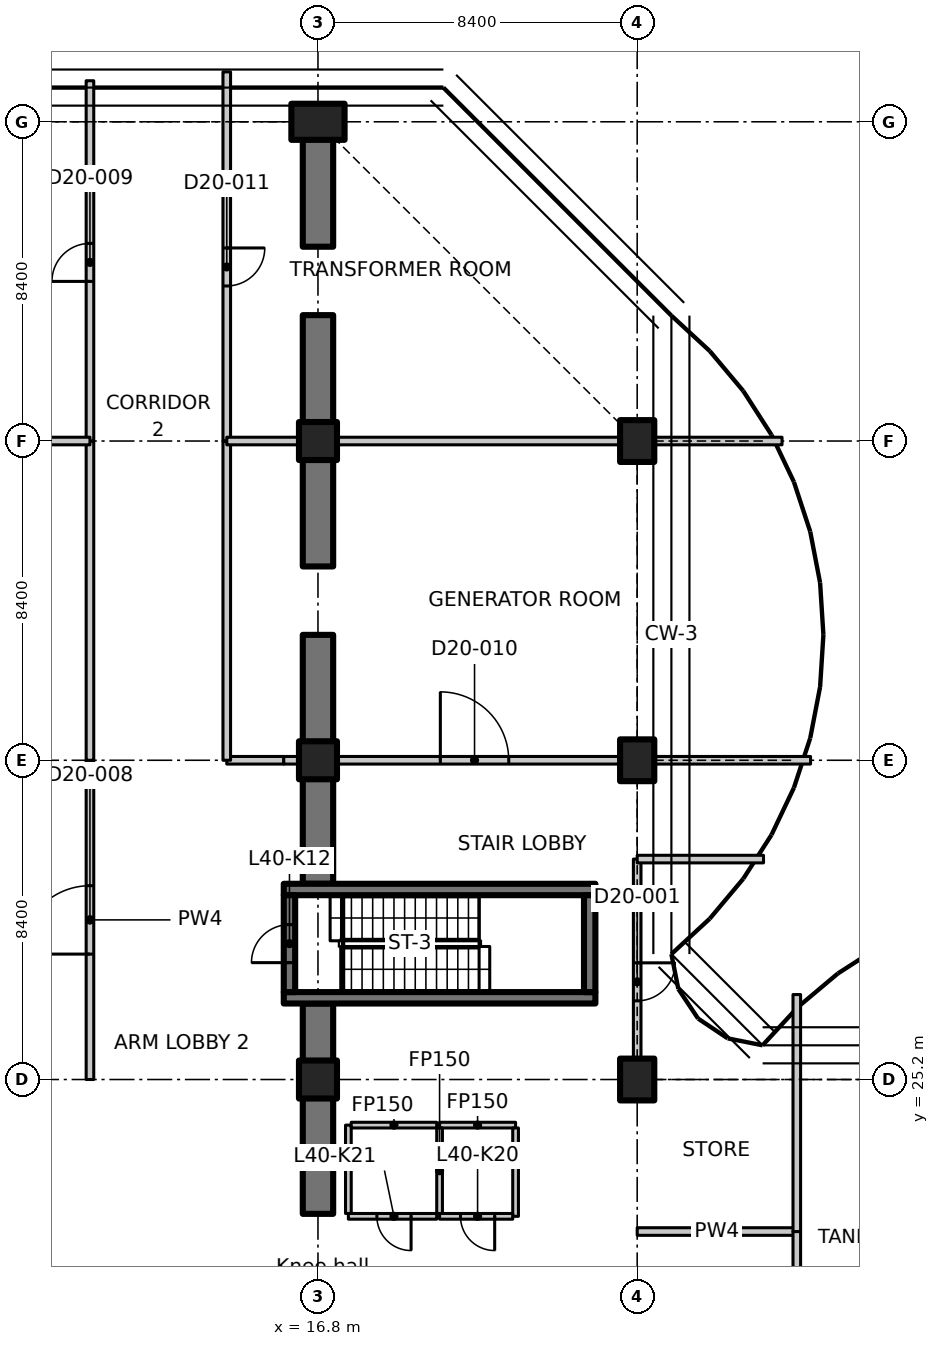
"""IFC4 building model, lengths in metres.
Left out: names, types, materials, properties, quantities, classifications, styles, units other than length and angle.
Written with IfcOpenShell. Run it as: python <this file> out.ifc"""

import sys

from ifc_helpers import new_model, si_unit, direction, frame, frame_2d, origin, origin_2d, place, context, subcontext, project, spatial, polyline, rectangle, outline, extrude, element, fill, save


model = new_model("IFC4")
c1 = context("Model", 3, precision=1e-05, world=origin(), true_north=direction((0.0, 1.0)))
c2 = subcontext(c1, "Body", "Model", "MODEL_VIEW")
j1 = project(units=[si_unit("LENGTHUNIT", "METRE"), si_unit("PLANEANGLEUNIT", "RADIAN")], contexts=[c1])
p1 = place(None, origin())
s1 = spatial("IfcSite", under=j1, at=p1, CompositionType="ELEMENT")
p2 = place(p1, origin())
s2 = spatial("IfcBuilding", under=s1, at=p2, CompositionType="ELEMENT")
p3 = place(p2, frame((0.0, 0.0, 162.0)))
s3 = spatial("IfcBuildingStorey", under=s2, at=p3, CompositionType="ELEMENT", Elevation=162.0)
for number, where, z_axis, x_axis in (
    (1, (16.8, 25.2, 0.0), (0.0, 0.0, 1.0), (1.0, 0.0, 0.0)),
    (2, (16.8, 33.6, 0.0), (0.0, 0.0, 1.0), (1.0, 0.0, 0.0)),
    (3, (16.8, 42.0, 0.0), (0.0, 0.0, 1.0), (1.0, 0.0, 0.0)),
):
    element("IfcColumn", number, at=place(p3, frame(where, z_axis=z_axis, x_axis=x_axis)), inside=s3, PredefinedType="COLUMN", context=c2, shape_type="SweptSolid", body=[
        extrude(rectangle(XDim=1.0, YDim=1.0, at=origin_2d()), origin(), (0.0, 0.0, 1.0), 4.55),
    ])
p4 = place(p3, frame((16.8, 50.4, 0.0), z_axis=(0.0, 0.0, 1.0), x_axis=(0.0, 1.0, 0.0)))
e4 = element("IfcColumn", 4, at=p4, inside=s3, PredefinedType="COLUMN", context=c2, shape_type="SweptSolid", body=[
    extrude(rectangle(XDim=0.95, YDim=1.4, at=origin_2d()), origin(), (0.0, 0.0, 1.0), 4.55),
])
for number, where, z_axis, x_axis in (
    (5, (25.2, 25.2, 0.0), (0.0, 0.0, 1.0), (1.0, 0.0, 0.0)),
    (6, (25.2, 33.6, 0.0), (0.0, 0.0, 1.0), (1.0, 0.0, 0.0)),
    (7, (25.2, 42.0, 0.0), (0.0, 0.0, 1.0), (1.0, 0.0, 0.0)),
):
    element("IfcColumn", number, at=place(p3, frame(where, z_axis=z_axis, x_axis=x_axis)), inside=s3, PredefinedType="COLUMN", context=c2, shape_type="SweptSolid", body=[
        extrude(rectangle(XDim=0.9, YDim=1.1, at=origin_2d()), origin(), (0.0, 0.0, 1.0), 4.55),
    ])
p5 = place(p3, frame((16.8, 21.665, 0.0), z_axis=(0.0, 0.0, 1.0), x_axis=(0.0, 1.0, 0.0)))
e8 = element("IfcWall", 8, at=p5, inside=s3, PredefinedType="SHEAR", context=c2, shape_type="SweptSolid", body=[
    extrude(rectangle(XDim=3.065, YDim=0.8, at=frame_2d((1.532, 0.0))), origin(), (0.0, 0.0, 1.0), 4.55),
])
p6 = place(p3, frame((16.8, 30.35, 0.0), z_axis=(0.0, 0.0, 1.0), x_axis=(0.0, 1.0, 0.0)))
e9 = element("IfcWall", 9, at=p6, inside=s3, PredefinedType="SHEAR", context=c2, shape_type="SweptSolid", body=[
    extrude(rectangle(XDim=2.78, YDim=0.8, at=frame_2d((1.39, 0.0))), origin(), (0.0, 0.0, 1.0), 4.55),
])
p7 = place(p3, frame((16.8, 25.67, 0.0), z_axis=(0.0, 0.0, 1.0), x_axis=(0.0, 1.0, 0.0)))
e10 = element("IfcWall", 10, at=p7, inside=s3, PredefinedType="SHEAR", context=c2, shape_type="SweptSolid", body=[
    extrude(rectangle(XDim=1.53, YDim=0.8, at=frame_2d((0.765, 0.0))), origin(), (0.0, 0.0, 1.0), 4.55),
])
p8 = place(p3, frame((16.8, 34.07, 0.0), z_axis=(0.0, 0.0, 1.0), x_axis=(0.0, 1.0, 0.0)))
e11 = element("IfcWall", 11, at=p8, inside=s3, PredefinedType="SHEAR", context=c2, shape_type="SweptSolid", body=[
    extrude(rectangle(XDim=2.83, YDim=0.8, at=frame_2d((1.415, 0.0))), origin(), (0.0, 0.0, 1.0), 4.55),
])
p9 = place(p3, frame((16.8, 38.7, 0.0), z_axis=(0.0, 0.0, 1.0), x_axis=(0.0, 1.0, 0.0)))
e12 = element("IfcWall", 12, at=p9, inside=s3, PredefinedType="SHEAR", context=c2, shape_type="SweptSolid", body=[
    extrude(rectangle(XDim=2.83, YDim=0.8, at=frame_2d((1.415, 0.0))), origin(), (0.0, 0.0, 1.0), 4.55),
])
for number, where, z_axis, x_axis in (
    (13, (16.8, 42.47, 0.0), (0.0, 0.0, 1.0), (0.0, 1.0, 0.0)),
    (14, (16.8, 47.113, 0.0), (0.0, 0.0, 1.0), (0.0, 1.0, 0.0)),
):
    element("IfcWall", number, at=place(p3, frame(where, z_axis=z_axis, x_axis=x_axis)), inside=s3, PredefinedType="SHEAR", context=c2, shape_type="SweptSolid", body=[
        extrude(rectangle(XDim=2.843, YDim=0.8, at=frame_2d((1.421, 0.0))), origin(), (0.0, 0.0, 1.0), 4.55),
    ])
for number, where, z_axis, x_axis in (
    (15, (15.9, 27.35, 0.0), (0.0, 0.0, 1.0), (1.0, 0.0, 0.0)),
    (16, (15.9, 30.2, 0.0), (0.0, 0.0, 1.0), (1.0, 0.0, 0.0)),
):
    element("IfcWall", number, at=place(p3, frame(where, z_axis=z_axis, x_axis=x_axis)), inside=s3, PredefinedType="SHEAR", context=c2, shape_type="SweptSolid", body=[
        extrude(rectangle(XDim=8.2, YDim=0.3, at=frame_2d((4.1, 0.0))), origin(), (0.0, 0.0, 1.0), 4.55),
    ])
p10 = place(p3, frame((16.05, 27.5, 0.0), z_axis=(0.0, 0.0, 1.0), x_axis=(0.0, 1.0, 0.0)))
e17 = element("IfcWall", 17, at=p10, inside=s3, PredefinedType="SHEAR", context=c2, shape_type="SweptSolid", body=[
    extrude(rectangle(XDim=2.55, YDim=0.3, at=frame_2d((1.275, 0.0))), origin(), (0.0, 0.0, 1.0), 4.55),
])
p11 = place(p10, frame((0.775, 0.0, 0.0)))
e18 = element("IfcOpeningElement", 18, at=p11, cuts=e17, PredefinedType="OPENING", context=c2, shape_type="SweptSolid", body=[
    extrude(rectangle(XDim=1.0, YDim=2.1, at=frame_2d((0.5, 1.05))), frame((0.0, 0.16, 0.0), z_axis=(0.0, -1.0, 0.0), x_axis=(1.0, 0.0, 0.0)), (0.0, 0.0, 1.0), 0.32),
])
p12 = place(p3, frame((23.95, 27.5, 0.0), z_axis=(0.0, 0.0, 1.0), x_axis=(0.0, 1.0, 0.0)))
e19 = element("IfcWall", 19, at=p12, inside=s3, PredefinedType="SHEAR", context=c2, shape_type="SweptSolid", body=[
    extrude(rectangle(XDim=2.55, YDim=0.3, at=frame_2d((1.275, 0.0))), origin(), (0.0, 0.0, 1.0), 4.55),
])
p13 = place(p3, frame((20.0, 24.0, 0.0), z_axis=(0.0, 0.0, 1.0), x_axis=(1.0, 0.0, 0.0)))
e20 = element("IfcWall", 20, at=p13, inside=s3, PredefinedType="PARTITIONING", context=c2, shape_type="SweptSolid", body=[
    extrude(rectangle(XDim=2.0, YDim=0.15, at=frame_2d((1.0, 0.0))), origin(), (0.0, 0.0, 1.0), 4.55),
])
p14 = place(p3, frame((22.0, 23.925, 0.0), z_axis=(0.0, 0.0, 1.0), x_axis=(0.0, -1.0, 0.0)))
e21 = element("IfcWall", 21, at=p14, inside=s3, PredefinedType="PARTITIONING", context=c2, shape_type="SweptSolid", body=[
    extrude(rectangle(XDim=2.325, YDim=0.15, at=frame_2d((1.163, 0.0))), origin(), (0.0, 0.0, 1.0), 4.55),
])
p15 = place(p3, frame((21.925, 21.6, 0.0), z_axis=(0.0, 0.0, 1.0), x_axis=(-1.0, 0.0, 0.0)))
e22 = element("IfcWall", 22, at=p15, inside=s3, PredefinedType="PARTITIONING", context=c2, shape_type="SweptSolid", body=[
    extrude(rectangle(XDim=1.925, YDim=0.15, at=frame_2d((0.962, 0.0))), origin(), (0.0, 0.0, 1.0), 4.55),
])
p16 = place(p15, frame((0.475, 0.0, 0.0)))
e23 = element("IfcOpeningElement", 23, at=p16, cuts=e22, PredefinedType="OPENING", context=c2, shape_type="SweptSolid", body=[
    extrude(rectangle(XDim=0.9, YDim=2.1, at=frame_2d((0.45, 1.05))), frame((0.0, 0.085, 0.0), z_axis=(0.0, -1.0, 0.0), x_axis=(1.0, 0.0, 0.0)), (0.0, 0.0, 1.0), 0.17),
])
p17 = place(p3, frame((20.0, 21.675, 0.0), z_axis=(0.0, 0.0, 1.0), x_axis=(0.0, 1.0, 0.0)))
e24 = element("IfcWall", 24, at=p17, inside=s3, PredefinedType="PARTITIONING", context=c2, shape_type="SweptSolid", body=[
    extrude(rectangle(XDim=2.25, YDim=0.15, at=frame_2d((1.125, 0.0))), origin(), (0.0, 0.0, 1.0), 4.55),
])
p18 = place(p3, frame((19.925, 21.6, 0.0), z_axis=(0.0, 0.0, 1.0), x_axis=(-1.0, 0.0, 0.0)))
e25 = element("IfcWall", 25, at=p18, inside=s3, PredefinedType="PARTITIONING", context=c2, shape_type="SweptSolid", body=[
    extrude(rectangle(XDim=2.325, YDim=0.15, at=frame_2d((1.163, 0.0))), origin(), (0.0, 0.0, 1.0), 4.55),
])
p19 = place(p18, frame((0.675, 0.0, 0.0)))
e26 = element("IfcOpeningElement", 26, at=p19, cuts=e25, PredefinedType="OPENING", context=c2, shape_type="SweptSolid", body=[
    extrude(rectangle(XDim=0.9, YDim=2.1, at=frame_2d((0.45, 1.05))), frame((0.0, 0.085, 0.0), z_axis=(0.0, -1.0, 0.0), x_axis=(1.0, 0.0, 0.0)), (0.0, 0.0, 1.0), 0.17),
])
p20 = place(p3, frame((17.6, 21.675, 0.0), z_axis=(0.0, 0.0, 1.0), x_axis=(0.0, 1.0, 0.0)))
e27 = element("IfcWall", 27, at=p20, inside=s3, PredefinedType="PARTITIONING", context=c2, shape_type="SweptSolid", body=[
    extrude(rectangle(XDim=2.325, YDim=0.15, at=frame_2d((1.163, 0.0))), origin(), (0.0, 0.0, 1.0), 4.55),
])
p21 = place(p3, frame((17.675, 24.0, 0.0), z_axis=(0.0, 0.0, 1.0), x_axis=(1.0, 0.0, 0.0)))
e28 = element("IfcWall", 28, at=p21, inside=s3, PredefinedType="PARTITIONING", context=c2, shape_type="SweptSolid", body=[
    extrude(rectangle(XDim=2.25, YDim=0.15, at=frame_2d((1.125, 0.0))), origin(), (0.0, 0.0, 1.0), 4.55),
])
p22 = place(p3, frame((25.2, 21.2, 0.0), z_axis=(0.0, 0.0, 1.0), x_axis=(1.0, 0.0, 0.0)))
e29 = element("IfcWall", 29, at=p22, inside=s3, PredefinedType="PARTITIONING", context=c2, shape_type="SweptSolid", body=[
    extrude(rectangle(XDim=4.2, YDim=0.2, at=frame_2d((2.1, 0.0))), origin(), (0.0, 0.0, 1.0), 4.53),
])
p23 = place(p3, frame((29.4, 21.2, 0.0), z_axis=(0.0, 0.0, 1.0), x_axis=(0.0, -1.0, 0.0)))
e30 = element("IfcWall", 30, at=p23, inside=s3, PredefinedType="PARTITIONING", context=c2, shape_type="SweptSolid", body=[
    extrude(rectangle(XDim=8.2, YDim=0.2, at=frame_2d((4.1, 0.0))), origin(), (0.0, 0.0, 1.0), 4.53),
])
p24 = place(p3, frame((29.4, 27.436, 0.0), z_axis=(0.0, 0.0, 1.0), x_axis=(0.0, -1.0, 0.0)))
e31 = element("IfcWall", 31, at=p24, inside=s3, PredefinedType="PARTITIONING", context=c2, shape_type="SweptSolid", body=[
    extrude(outline(polyline([(0.0, 0.0), (6.236, 0.0), (6.236, 4.53), (2.686, 4.53), (2.684, 4.18), (1.788, 4.18), (1.786, 4.53), (0.161, 4.53), (0.0, 4.53), (0.0, 0.0)])), frame((0.0, 0.1, 0.0), z_axis=(0.0, -1.0, 0.0), x_axis=(1.0, 0.0, 0.0)), (0.0, 0.0, 1.0), 0.2),
])
p25 = place(p3, frame((25.2, 31.0, 0.0), z_axis=(0.0, 0.0, 1.0), x_axis=(0.0, -1.0, 0.0)))
e32 = element("IfcWall", 32, at=p25, inside=s3, PredefinedType="PARTITIONING", context=c2, shape_type="SweptSolid", body=[
    extrude(outline(polyline([(0.0, 0.0), (5.23, 0.0), (5.23, 4.18), (0.0, 4.18), (0.0, 0.0)])), frame((0.0, 0.1, 0.0), z_axis=(0.0, -1.0, 0.0), x_axis=(1.0, 0.0, 0.0)), (0.0, 0.0, 1.0), 0.2),
])
p26 = place(p25, frame((2.73, 0.0, 0.0)))
e33 = element("IfcOpeningElement", 33, at=p26, cuts=e32, PredefinedType="OPENING", context=c2, shape_type="SweptSolid", body=[
    extrude(rectangle(XDim=1.0, YDim=2.1, at=frame_2d((0.5, 1.05))), frame((0.0, 0.11, 0.0), z_axis=(0.0, -1.0, 0.0), x_axis=(1.0, 0.0, 0.0)), (0.0, 0.0, 1.0), 0.22),
])
p27 = place(p3, frame((25.2, 31.0, 0.0), z_axis=(0.0, 0.0, 1.0), x_axis=(1.0, 0.0, 0.0)))
e34 = element("IfcWall", 34, at=p27, inside=s3, PredefinedType="PARTITIONING", context=c2, shape_type="SweptSolid", body=[
    extrude(rectangle(XDim=3.324, YDim=0.2, at=frame_2d((1.662, 0.0))), origin(), (0.0, 0.0, 1.0), 4.18),
])
p28 = place(p3, frame((10.8, 25.2, 0.0), z_axis=(0.0, 0.0, 1.0), x_axis=(0.0, 1.0, 0.0)))
e35 = element("IfcWall", 35, at=p28, inside=s3, PredefinedType="PARTITIONING", context=c2, shape_type="SweptSolid", body=[
    extrude(rectangle(XDim=8.4, YDim=0.2, at=frame_2d((4.2, 0.0))), origin(), (0.0, 0.0, 1.0), 4.53),
])
p29 = place(p28, frame((3.3, 0.0, 0.0)))
e36 = element("IfcOpeningElement", 36, at=p29, cuts=e35, PredefinedType="OPENING", context=c2, shape_type="SweptSolid", body=[
    extrude(rectangle(XDim=1.8, YDim=2.1, at=frame_2d((0.9, 1.05))), frame((0.0, 0.11, 0.0), z_axis=(0.0, -1.0, 0.0), x_axis=(1.0, 0.0, 0.0)), (0.0, 0.0, 1.0), 0.22),
])
p30 = place(p3, frame((14.4, 33.6, 0.0), z_axis=(0.0, 0.0, 1.0), x_axis=(1.0, 0.0, 0.0)))
e37 = element("IfcWall", 37, at=p30, inside=s3, PredefinedType="PARTITIONING", context=c2, shape_type="SweptSolid", body=[
    extrude(rectangle(XDim=1.5, YDim=0.2, at=frame_2d((0.75, 0.0))), origin(), (0.0, 0.0, 1.0), 4.53),
])
p31 = place(p3, frame((15.9, 33.6, 0.0), z_axis=(0.0, 0.0, 1.0), x_axis=(1.0, 0.0, 0.0)))
e38 = element("IfcWall", 38, at=p31, inside=s3, PredefinedType="PARTITIONING", context=c2, shape_type="SweptSolid", body=[
    extrude(rectangle(XDim=0.38, YDim=0.2, at=frame_2d((0.19, 0.0))), origin(), (0.0, 0.0, 1.0), 4.53),
])
p32 = place(p3, frame((17.32, 33.6, 0.0), z_axis=(0.0, 0.0, 1.0), x_axis=(1.0, 0.0, 0.0)))
e39 = element("IfcWall", 39, at=p32, inside=s3, PredefinedType="PARTITIONING", context=c2, shape_type="SweptSolid", body=[
    extrude(rectangle(XDim=7.41, YDim=0.2, at=frame_2d((3.705, 0.0))), origin(), (0.0, 0.0, 1.0), 4.53),
])
p33 = place(p32, frame((2.7, 0.0, 0.0)))
e40 = element("IfcOpeningElement", 40, at=p33, cuts=e39, PredefinedType="OPENING", context=c2, shape_type="SweptSolid", body=[
    extrude(rectangle(XDim=1.8, YDim=2.1, at=frame_2d((0.9, 1.05))), frame((0.0, 0.11, 0.0), z_axis=(0.0, -1.0, 0.0), x_axis=(1.0, 0.0, 0.0)), (0.0, 0.0, 1.0), 0.22),
])
p34 = place(p3, frame((25.67, 33.6, 0.0), z_axis=(0.0, 0.0, 1.0), x_axis=(1.0, 0.0, 0.0)))
e41 = element("IfcWall", 41, at=p34, inside=s3, PredefinedType="PARTITIONING", context=c2, shape_type="SweptSolid", body=[
    extrude(rectangle(XDim=4.092, YDim=0.2, at=frame_2d((2.046, 0.0))), origin(), (0.0, 0.0, 1.0), 4.18),
])
p35 = place(p3, frame((10.8, 33.6, 0.0), z_axis=(0.0, 0.0, 1.0), x_axis=(0.0, 1.0, 0.0)))
e42 = element("IfcWall", 42, at=p35, inside=s3, PredefinedType="PARTITIONING", context=c2, shape_type="SweptSolid", body=[
    extrude(rectangle(XDim=8.4, YDim=0.2, at=frame_2d((4.2, 0.0))), origin(), (0.0, 0.0, 1.0), 4.53),
])
p36 = place(p3, frame((10.8, 42.0, 0.0), z_axis=(0.0, 0.0, 1.0), x_axis=(0.0, 1.0, 0.0)))
e43 = element("IfcWall", 43, at=p36, inside=s3, PredefinedType="PARTITIONING", context=c2, shape_type="SweptSolid", body=[
    extrude(outline(polyline([(0.0, 0.0), (9.48, 0.0), (9.48, 4.53), (8.85, 4.53), (8.848, 4.18), (7.952, 4.18), (7.95, 4.53), (0.0, 4.53), (0.0, 0.0)])), frame((0.0, 0.1, 0.0), z_axis=(0.0, -1.0, 0.0), x_axis=(1.0, 0.0, 0.0)), (0.0, 0.0, 1.0), 0.2),
])
p37 = place(p36, frame((4.2, 0.0, 0.0)))
e44 = element("IfcOpeningElement", 44, at=p37, cuts=e43, PredefinedType="OPENING", context=c2, shape_type="SweptSolid", body=[
    extrude(rectangle(XDim=1.0, YDim=2.1, at=frame_2d((0.5, 1.05))), frame((0.0, 0.11, 0.0), z_axis=(0.0, -1.0, 0.0), x_axis=(1.0, 0.0, 0.0)), (0.0, 0.0, 1.0), 0.22),
])
p38 = place(p3, frame((14.4, 42.0, 0.0), z_axis=(0.0, 0.0, 1.0), x_axis=(0.0, -1.0, 0.0)))
e45 = element("IfcWall", 45, at=p38, inside=s3, PredefinedType="PARTITIONING", context=c2, shape_type="SweptSolid", body=[
    extrude(rectangle(XDim=8.4, YDim=0.2, at=frame_2d((4.2, 0.0))), origin(), (0.0, 0.0, 1.0), 4.53),
])
p39 = place(p3, frame((14.4, 51.713, 0.0), z_axis=(0.0, 0.0, 1.0), x_axis=(0.0, -1.0, 0.0)))
e46 = element("IfcWall", 46, at=p39, inside=s3, PredefinedType="PARTITIONING", context=c2, shape_type="SweptSolid", body=[
    extrude(outline(polyline([(0.0, 0.0), (9.713, 0.0), (9.713, 4.53), (1.763, 4.53), (1.761, 4.18), (0.865, 4.18), (0.863, 4.53), (0.233, 4.53), (0.0, 4.53), (0.0, 0.0)])), frame((0.0, 0.1, 0.0), z_axis=(0.0, -1.0, 0.0), x_axis=(1.0, 0.0, 0.0)), (0.0, 0.0, 1.0), 0.2),
])
p40 = place(p39, frame((4.633, 0.0, 0.0)))
e47 = element("IfcOpeningElement", 47, at=p40, cuts=e46, PredefinedType="OPENING", context=c2, shape_type="SweptSolid", body=[
    extrude(rectangle(XDim=1.0, YDim=2.1, at=frame_2d((0.5, 1.05))), frame((0.0, 0.11, 0.0), z_axis=(0.0, -1.0, 0.0), x_axis=(1.0, 0.0, 0.0)), (0.0, 0.0, 1.0), 0.22),
])
for number, where, z_axis, x_axis in (
    (48, (8.92, 42.0, 0.0), (0.0, 0.0, 1.0), (1.0, 0.0, 0.0)),
    (49, (14.4, 42.0, 0.0), (0.0, 0.0, 1.0), (1.0, 0.0, 0.0)),
):
    element("IfcWall", number, at=place(p3, frame(where, z_axis=z_axis, x_axis=x_axis)), inside=s3, PredefinedType="PARTITIONING", context=c2, shape_type="SweptSolid", body=[
        extrude(rectangle(XDim=1.88, YDim=0.2, at=frame_2d((0.94, 0.0))), origin(), (0.0, 0.0, 1.0), 4.53),
    ])
p41 = place(p3, frame((17.32, 42.0, 0.0), z_axis=(0.0, 0.0, 1.0), x_axis=(1.0, 0.0, 0.0)))
e50 = element("IfcWall", 50, at=p41, inside=s3, PredefinedType="PARTITIONING", context=c2, shape_type="SweptSolid", body=[
    extrude(outline(polyline([(0.0, 0.0), (7.41, 0.0), (7.41, 4.18), (7.166, 4.18), (7.164, 4.53), (0.0, 4.53), (0.0, 0.0)])), frame((0.0, 0.1, 0.0), z_axis=(0.0, -1.0, 0.0), x_axis=(1.0, 0.0, 0.0)), (0.0, 0.0, 1.0), 0.2),
])
p42 = place(p3, frame((25.67, 42.0, 0.0), z_axis=(0.0, 0.0, 1.0), x_axis=(1.0, 0.0, 0.0)))
e51 = element("IfcWall", 51, at=p42, inside=s3, PredefinedType="PARTITIONING", context=c2, shape_type="SweptSolid", body=[
    extrude(rectangle(XDim=3.342, YDim=0.2, at=frame_2d((1.671, 0.0))), origin(), (0.0, 0.0, 1.0), 4.18),
])
p43 = place(p11, origin())
e52 = element("IfcDoor", 52, at=p43, inside=s3, OperationType="SINGLE_SWING_RIGHT", PredefinedType="DOOR", context=c2, shape_type="SweptSolid", body=[
    extrude(rectangle(XDim=1.0, YDim=2.1, at=frame_2d((0.5, 1.05))), frame((0.0, 0.025, 0.0), z_axis=(0.0, -1.0, 0.0), x_axis=(1.0, 0.0, 0.0)), (0.0, 0.0, 1.0), 0.05),
])
fill(e18, e52)
p44 = place(p16, origin())
e53 = element("IfcDoor", 53, at=p44, inside=s3, OperationType="SINGLE_SWING_RIGHT", PredefinedType="DOOR", context=c2, shape_type="SweptSolid", body=[
    extrude(rectangle(XDim=0.9, YDim=2.1, at=frame_2d((0.45, 1.05))), frame((0.0, 0.025, 0.0), z_axis=(0.0, -1.0, 0.0), x_axis=(1.0, 0.0, 0.0)), (0.0, 0.0, 1.0), 0.05),
])
fill(e23, e53)
p45 = place(p19, origin())
e54 = element("IfcDoor", 54, at=p45, inside=s3, OperationType="SINGLE_SWING_LEFT", PredefinedType="DOOR", context=c2, shape_type="SweptSolid", body=[
    extrude(rectangle(XDim=0.9, YDim=2.1, at=frame_2d((0.45, 1.05))), frame((0.0, 0.025, 0.0), z_axis=(0.0, -1.0, 0.0), x_axis=(1.0, 0.0, 0.0)), (0.0, 0.0, 1.0), 0.05),
])
fill(e26, e54)
p46 = place(p26, origin())
e55 = element("IfcDoor", 55, at=p46, inside=s3, OperationType="SINGLE_SWING_RIGHT", PredefinedType="DOOR", context=c2, shape_type="SweptSolid", body=[
    extrude(rectangle(XDim=1.0, YDim=2.1, at=frame_2d((0.5, 1.05))), frame((0.0, 0.025, 0.0), z_axis=(0.0, -1.0, 0.0), x_axis=(1.0, 0.0, 0.0)), (0.0, 0.0, 1.0), 0.05),
])
fill(e33, e55)
p47 = place(p29, origin())
e56 = element("IfcDoor", 56, at=p47, inside=s3, OperationType="DOUBLE_DOOR_SINGLE_SWING", PredefinedType="DOOR", context=c2, shape_type="SweptSolid", body=[
    extrude(rectangle(XDim=1.8, YDim=2.1, at=frame_2d((0.9, 1.05))), frame((0.0, 0.025, 0.0), z_axis=(0.0, -1.0, 0.0), x_axis=(1.0, 0.0, 0.0)), (0.0, 0.0, 1.0), 0.05),
])
fill(e36, e56)
p48 = place(p37, origin())
e57 = element("IfcDoor", 57, at=p48, inside=s3, OperationType="SINGLE_SWING_LEFT", PredefinedType="DOOR", context=c2, shape_type="SweptSolid", body=[
    extrude(rectangle(XDim=1.0, YDim=2.1, at=frame_2d((0.5, 1.05))), frame((0.0, 0.025, 0.0), z_axis=(0.0, -1.0, 0.0), x_axis=(1.0, 0.0, 0.0)), (0.0, 0.0, 1.0), 0.05),
])
fill(e44, e57)
p49 = place(p33, origin())
e58 = element("IfcDoor", 58, at=p49, inside=s3, OperationType="DOUBLE_DOOR_SINGLE_SWING", PredefinedType="DOOR", context=c2, shape_type="SweptSolid", body=[
    extrude(rectangle(XDim=1.8, YDim=2.1, at=frame_2d((0.9, 1.05))), frame((0.0, 0.025, 0.0), z_axis=(0.0, -1.0, 0.0), x_axis=(1.0, 0.0, 0.0)), (0.0, 0.0, 1.0), 0.05),
])
fill(e40, e58)
p50 = place(p40, origin())
e59 = element("IfcDoor", 59, at=p50, inside=s3, OperationType="SINGLE_SWING_LEFT", PredefinedType="DOOR", context=c2, shape_type="SweptSolid", body=[
    extrude(rectangle(XDim=1.0, YDim=2.1, at=frame_2d((0.5, 1.05))), frame((0.0, 0.025, 0.0), z_axis=(0.0, -1.0, 0.0), x_axis=(1.0, 0.0, 0.0)), (0.0, 0.0, 1.0), 0.05),
])
fill(e47, e59)
save(model, sys.argv[1])
